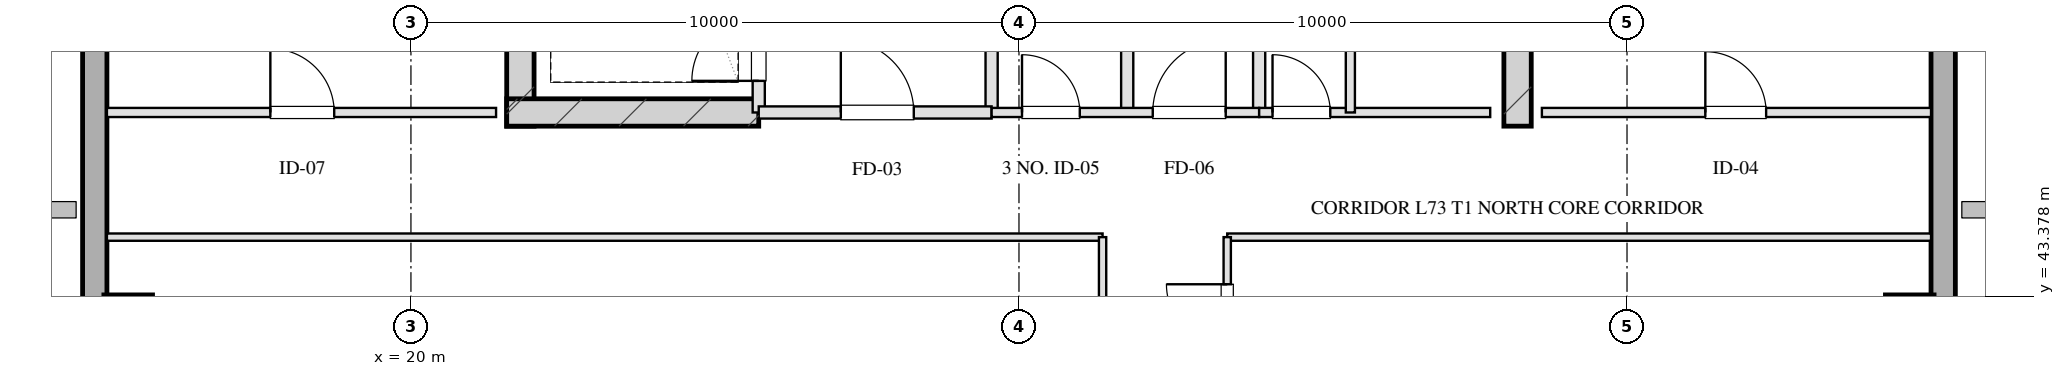
"""IFC4 building model, lengths in metres.
Left out: names, types, materials, properties, quantities, classifications, styles, units other than length and angle.
Written with IfcOpenShell. Run it as: python <this file> out.ifc"""

import sys

from ifc_helpers import new_model, si_unit, direction, frame, frame_2d, origin, origin_2d, place, context, subcontext, project, spatial, rectangle, hollow_rectangle, extrude, element, fill, save


model = new_model("IFC4")
c1 = context("Model", 3, precision=1e-05, world=origin(), true_north=direction((0.0, 1.0)))
c2 = subcontext(c1, "Body", "Model", "MODEL_VIEW")
j1 = project(units=[si_unit("LENGTHUNIT", "METRE"), si_unit("PLANEANGLEUNIT", "RADIAN")], contexts=[c1])
p1 = place(None, origin())
s1 = spatial("IfcSite", under=j1, at=p1, CompositionType="ELEMENT")
p2 = place(p1, origin())
s2 = spatial("IfcBuilding", under=s1, at=p2, CompositionType="ELEMENT")
p3 = place(p2, frame((0.0, 0.0, 266.4)))
s3 = spatial("IfcBuildingStorey", under=s2, at=p3, CompositionType="ELEMENT", Elevation=266.4)
for number, where, z_axis, x_axis in (
    (1, (21.8, 46.175, 0.0), (0.0, 0.0, 1.0), (0.0, 1.0, 0.0)),
    (2, (38.2, 46.175, 0.0), (0.0, 0.0, 1.0), (0.0, 1.0, 0.0)),
):
    element("IfcWall", number, at=place(p3, frame(where, z_axis=z_axis, x_axis=x_axis)), inside=s3, PredefinedType="SHEAR", context=c2, shape_type="SweptSolid", body=[
        extrude(rectangle(XDim=9.33, YDim=0.45, at=frame_2d((4.665, 0.0))), origin(), (0.0, 0.0, 1.0), 3.2),
    ])
p4 = place(p3, frame((21.575, 46.4, 0.0), z_axis=(0.0, 0.0, 1.0), x_axis=(1.0, 0.0, 0.0)))
e3 = element("IfcWall", 3, at=p4, inside=s3, PredefinedType="SHEAR", context=c2, shape_type="SweptSolid", body=[
    extrude(rectangle(XDim=4.145, YDim=0.45, at=frame_2d((2.073, 0.0))), origin(), (0.0, 0.0, 1.0), 3.2),
])
for number, where, z_axis, x_axis in (
    (4, (15.35, 43.0, 0.0), (0.0, 0.0, 1.0), (1.0, 0.0, 0.0)),
    (5, (44.65, 43.0, 0.0), (0.0, 0.0, 1.0), (1.0, 0.0, 0.0)),
):
    element("IfcColumn", number, at=place(p3, frame(where, z_axis=z_axis, x_axis=x_axis)), inside=s3, PredefinedType="COLUMN", context=c2, shape_type="SweptSolid", body=[
        extrude(hollow_rectangle(XDim=0.8, YDim=0.8, WallThickness=0.028, at=origin_2d()), origin(), (0.0, 0.0, 1.0), 3.201),
    ])
p5 = place(p3, frame((14.8, 13.1, 0.0), z_axis=(0.0, 0.0, 1.0), x_axis=(0.0, 1.0, 0.0)))
e6 = element("IfcWall", 6, at=p5, inside=s3, PredefinedType="SOLIDWALL", context=c2, shape_type="SweptSolid", body=[
    extrude(rectangle(XDim=41.8, YDim=0.4, at=frame_2d((20.9, 0.0))), origin(), (0.0, 0.0, 1.0), 2.36),
])
p6 = place(p5, frame((13.525, 0.0, 0.75)))
e7 = element("IfcOpeningElement", 7, at=p6, cuts=e6, PredefinedType="OPENING", context=c2, shape_type="SweptSolid", body=[
    extrude(rectangle(XDim=1.95, YDim=1.21, at=frame_2d((0.975, 0.605))), frame((0.0, 0.21, 0.0), z_axis=(0.0, -1.0, 0.0), x_axis=(1.0, 0.0, 0.0)), (0.0, 0.0, 1.0), 0.42),
])
p7 = place(p5, frame((17.325, 0.0, 0.75)))
e8 = element("IfcOpeningElement", 8, at=p7, cuts=e6, PredefinedType="OPENING", context=c2, shape_type="SweptSolid", body=[
    extrude(rectangle(XDim=1.95, YDim=1.21, at=frame_2d((0.975, 0.605))), frame((0.0, 0.21, 0.0), z_axis=(0.0, -1.0, 0.0), x_axis=(1.0, 0.0, 0.0)), (0.0, 0.0, 1.0), 0.42),
])
p8 = place(p5, frame((26.15, 0.0, 0.0)))
e9 = element("IfcOpeningElement", 9, at=p8, cuts=e6, PredefinedType="OPENING", context=c2, shape_type="SweptSolid", body=[
    extrude(rectangle(XDim=1.1, YDim=2.15, at=frame_2d((0.55, 1.075))), frame((0.0, 0.21, 0.0), z_axis=(0.0, -1.0, 0.0), x_axis=(1.0, 0.0, 0.0)), (0.0, 0.0, 1.0), 0.42),
])
p9 = place(p3, frame((45.2, 54.9, 0.0), z_axis=(0.0, 0.0, 1.0), x_axis=(0.0, -1.0, 0.0)))
e10 = element("IfcWall", 10, at=p9, inside=s3, PredefinedType="SOLIDWALL", context=c2, shape_type="SweptSolid", body=[
    extrude(rectangle(XDim=41.8, YDim=0.4, at=frame_2d((20.9, 0.0))), origin(), (0.0, 0.0, 1.0), 2.36),
])
p10 = place(p9, frame((26.325, 0.0, 0.75)))
e11 = element("IfcOpeningElement", 11, at=p10, cuts=e10, PredefinedType="OPENING", context=c2, shape_type="SweptSolid", body=[
    extrude(rectangle(XDim=1.95, YDim=1.21, at=frame_2d((0.975, 0.605))), frame((0.0, 0.21, 0.0), z_axis=(0.0, -1.0, 0.0), x_axis=(1.0, 0.0, 0.0)), (0.0, 0.0, 1.0), 0.42),
])
p11 = place(p9, frame((22.525, 0.0, 0.75)))
e12 = element("IfcOpeningElement", 12, at=p11, cuts=e10, PredefinedType="OPENING", context=c2, shape_type="SweptSolid", body=[
    extrude(rectangle(XDim=1.95, YDim=1.21, at=frame_2d((0.975, 0.605))), frame((0.0, 0.21, 0.0), z_axis=(0.0, -1.0, 0.0), x_axis=(1.0, 0.0, 0.0)), (0.0, 0.0, 1.0), 0.42),
])
p12 = place(p9, frame((14.55, 0.0, 0.0)))
e13 = element("IfcOpeningElement", 13, at=p12, cuts=e10, PredefinedType="OPENING", context=c2, shape_type="SweptSolid", body=[
    extrude(rectangle(XDim=1.1, YDim=2.15, at=frame_2d((0.55, 1.075))), frame((0.0, 0.21, 0.0), z_axis=(0.0, -1.0, 0.0), x_axis=(1.0, 0.0, 0.0)), (0.0, 0.0, 1.0), 0.42),
])
p13 = place(p3, frame((25.72, 46.4, 0.0), z_axis=(0.0, 0.0, 1.0), x_axis=(0.0, 1.0, 0.0)))
e14 = element("IfcWall", 14, at=p13, inside=s3, PredefinedType="PARTITIONING", context=c2, shape_type="SweptSolid", body=[
    extrude(rectangle(XDim=1.9, YDim=0.2, at=frame_2d((0.95, 0.0))), origin(), (0.0, 0.0, 1.0), 2.925),
])
p14 = place(p13, frame((0.52, 0.0, 0.0)))
e15 = element("IfcOpeningElement", 15, at=p14, cuts=e14, PredefinedType="OPENING", context=c2, shape_type="SweptSolid", body=[
    extrude(rectangle(XDim=1.1, YDim=2.05, at=frame_2d((0.55, 1.025))), frame((0.0, 0.11, 0.0), z_axis=(0.0, -1.0, 0.0), x_axis=(1.0, 0.0, 0.0)), (0.0, 0.0, 1.0), 0.22),
])
p15 = place(p3, frame((29.55, 46.4, 0.0), z_axis=(0.0, 0.0, 1.0), x_axis=(0.0, 1.0, 0.0)))
e16 = element("IfcWall", 16, at=p15, inside=s3, PredefinedType="PARTITIONING", context=c2, shape_type="SweptSolid", body=[
    extrude(rectangle(XDim=8.43, YDim=0.2, at=frame_2d((4.215, 0.0))), origin(), (0.0, 0.0, 1.0), 2.925),
])
p16 = place(p3, frame((25.72, 46.4, 0.0), z_axis=(0.0, 0.0, 1.0), x_axis=(1.0, 0.0, 0.0)))
e17 = element("IfcWall", 17, at=p16, inside=s3, PredefinedType="PARTITIONING", context=c2, shape_type="SweptSolid", body=[
    extrude(rectangle(XDim=3.83, YDim=0.2, at=frame_2d((1.915, 0.0))), origin(), (0.0, 0.0, 1.0), 2.925),
])
p17 = place(p16, frame((1.35, 0.0, 0.0)))
e18 = element("IfcOpeningElement", 18, at=p17, cuts=e17, PredefinedType="OPENING", context=c2, shape_type="SweptSolid", body=[
    extrude(rectangle(XDim=1.2, YDim=2.05, at=frame_2d((0.6, 1.025))), frame((0.0, 0.11, 0.0), z_axis=(0.0, -1.0, 0.0), x_axis=(1.0, 0.0, 0.0)), (0.0, 0.0, 1.0), 0.22),
])
for number, where, z_axis, x_axis in (
    (19, (33.95, 46.4, 0.0), (0.0, 0.0, 1.0), (0.0, 1.0, 0.0)),
    (20, (31.78, 46.4, 0.0), (0.0, 0.0, 1.0), (0.0, 1.0, 0.0)),
):
    element("IfcWall", number, at=place(p3, frame(where, z_axis=z_axis, x_axis=x_axis)), inside=s3, PredefinedType="PARTITIONING", context=c2, shape_type="SweptSolid", body=[
        extrude(rectangle(XDim=8.43, YDim=0.2, at=frame_2d((4.215, 0.0))), origin(), (0.0, 0.0, 1.0), 2.925),
    ])
p18 = place(p3, frame((29.55, 46.4, 0.0), z_axis=(0.0, 0.0, 1.0), x_axis=(1.0, 0.0, 0.0)))
e21 = element("IfcWall", 21, at=p18, inside=s3, PredefinedType="PARTITIONING", context=c2, shape_type="SweptSolid", body=[
    extrude(rectangle(XDim=4.4, YDim=0.15, at=frame_2d((2.2, 0.0))), origin(), (0.0, 0.0, 1.0), 2.925),
])
p19 = place(p18, frame((0.5, 0.0, 0.0)))
e22 = element("IfcOpeningElement", 22, at=p19, cuts=e21, PredefinedType="OPENING", context=c2, shape_type="SweptSolid", body=[
    extrude(rectangle(XDim=0.95, YDim=2.05, at=frame_2d((0.475, 1.025))), frame((0.0, 0.085, 0.0), z_axis=(0.0, -1.0, 0.0), x_axis=(1.0, 0.0, 0.0)), (0.0, 0.0, 1.0), 0.17),
])
p20 = place(p18, frame((2.65, 0.0, 0.0)))
e23 = element("IfcOpeningElement", 23, at=p20, cuts=e21, PredefinedType="OPENING", context=c2, shape_type="SweptSolid", body=[
    extrude(rectangle(XDim=1.2, YDim=2.05, at=frame_2d((0.6, 1.025))), frame((0.0, 0.085, 0.0), z_axis=(0.0, -1.0, 0.0), x_axis=(1.0, 0.0, 0.0)), (0.0, 0.0, 1.0), 0.17),
])
p21 = place(p3, frame((33.95, 46.4, 0.0), z_axis=(0.0, 0.0, 1.0), x_axis=(1.0, 0.0, 0.0)))
e24 = element("IfcWall", 24, at=p21, inside=s3, PredefinedType="PARTITIONING", context=c2, shape_type="SweptSolid", body=[
    extrude(rectangle(XDim=3.8, YDim=0.15, at=frame_2d((1.9, 0.0))), origin(), (0.0, 0.0, 1.0), 2.925),
])
p22 = place(p21, frame((0.22, 0.0, 0.0)))
e25 = element("IfcOpeningElement", 25, at=p22, cuts=e24, PredefinedType="OPENING", context=c2, shape_type="SweptSolid", body=[
    extrude(rectangle(XDim=0.95, YDim=2.05, at=frame_2d((0.475, 1.025))), frame((0.0, 0.085, 0.0), z_axis=(0.0, -1.0, 0.0), x_axis=(1.0, 0.0, 0.0)), (0.0, 0.0, 1.0), 0.17),
])
p23 = place(p3, frame((35.45, 46.4, 0.0), z_axis=(0.0, 0.0, 1.0), x_axis=(0.0, 1.0, 0.0)))
e26 = element("IfcWall", 26, at=p23, inside=s3, PredefinedType="PARTITIONING", context=c2, shape_type="SweptSolid", body=[
    extrude(rectangle(XDim=8.43, YDim=0.15, at=frame_2d((4.215, 0.0))), origin(), (0.0, 0.0, 1.0), 2.565),
])
p24 = place(p23, frame((2.55, 0.0, 0.0)))
e27 = element("IfcOpeningElement", 27, at=p24, cuts=e26, PredefinedType="OPENING", context=c2, shape_type="SweptSolid", body=[
    extrude(rectangle(XDim=0.95, YDim=2.05, at=frame_2d((0.475, 1.025))), frame((0.0, 0.085, 0.0), z_axis=(0.0, -1.0, 0.0), x_axis=(1.0, 0.0, 0.0)), (0.0, 0.0, 1.0), 0.17),
])
p25 = place(p23, frame((5.8, 0.0, 0.0)))
e28 = element("IfcOpeningElement", 28, at=p25, cuts=e26, PredefinedType="OPENING", context=c2, shape_type="SweptSolid", body=[
    extrude(rectangle(XDim=0.9, YDim=2.05, at=frame_2d((0.45, 1.025))), frame((0.0, 0.085, 0.0), z_axis=(0.0, -1.0, 0.0), x_axis=(1.0, 0.0, 0.0)), (0.0, 0.0, 1.0), 0.17),
])
p26 = place(p3, frame((15.0, 46.4, 0.0), z_axis=(0.0, 0.0, 1.0), x_axis=(1.0, 0.0, 0.0)))
e29 = element("IfcWall", 29, at=p26, inside=s3, PredefinedType="PARTITIONING", context=c2, shape_type="SweptSolid", body=[
    extrude(rectangle(XDim=6.4, YDim=0.15, at=frame_2d((3.2, 0.0))), origin(), (0.0, 0.0, 1.0), 2.925),
])
p27 = place(p26, frame((2.688, 0.0, 0.0)))
e30 = element("IfcOpeningElement", 30, at=p27, cuts=e29, PredefinedType="OPENING", context=c2, shape_type="SweptSolid", body=[
    extrude(rectangle(XDim=1.05, YDim=2.05, at=frame_2d((0.525, 1.025))), frame((0.0, 0.085, 0.0), z_axis=(0.0, -1.0, 0.0), x_axis=(1.0, 0.0, 0.0)), (0.0, 0.0, 1.0), 0.17),
])
p28 = place(p3, frame((38.6, 46.4, 0.0), z_axis=(0.0, 0.0, 1.0), x_axis=(1.0, 0.0, 0.0)))
e31 = element("IfcWall", 31, at=p28, inside=s3, PredefinedType="PARTITIONING", context=c2, shape_type="SweptSolid", body=[
    extrude(rectangle(XDim=6.4, YDim=0.15, at=frame_2d((3.2, 0.0))), origin(), (0.0, 0.0, 1.0), 2.925),
])
p29 = place(p28, frame((2.688, 0.0, 0.0)))
e32 = element("IfcOpeningElement", 32, at=p29, cuts=e31, PredefinedType="OPENING", context=c2, shape_type="SweptSolid", body=[
    extrude(rectangle(XDim=1.0, YDim=2.05, at=frame_2d((0.5, 1.025))), frame((0.0, 0.085, 0.0), z_axis=(0.0, -1.0, 0.0), x_axis=(1.0, 0.0, 0.0)), (0.0, 0.0, 1.0), 0.17),
])
p30 = place(p3, frame((15.0, 44.35, 0.0), z_axis=(0.0, 0.0, 1.0), x_axis=(1.0, 0.0, 0.0)))
e33 = element("IfcWall", 33, at=p30, inside=s3, PredefinedType="PARTITIONING", context=c2, shape_type="SweptSolid", body=[
    extrude(rectangle(XDim=16.375, YDim=0.12, at=frame_2d((8.188, 0.0))), origin(), (0.0, 0.0, 1.0), 2.925),
])
p31 = place(p3, frame((33.425, 44.35, 0.0), z_axis=(0.0, 0.0, 1.0), x_axis=(1.0, 0.0, 0.0)))
e34 = element("IfcWall", 34, at=p31, inside=s3, PredefinedType="PARTITIONING", context=c2, shape_type="SweptSolid", body=[
    extrude(rectangle(XDim=11.575, YDim=0.12, at=frame_2d((5.788, 0.0))), origin(), (0.0, 0.0, 1.0), 2.925),
])
p32 = place(p3, frame((31.375, 23.65, 0.0), z_axis=(0.0, 0.0, 1.0), x_axis=(0.0, 1.0, 0.0)))
e35 = element("IfcWall", 35, at=p32, inside=s3, PredefinedType="PARTITIONING", context=c2, shape_type="SweptSolid", body=[
    extrude(rectangle(XDim=20.7, YDim=0.12, at=frame_2d((10.35, 0.0))), origin(), (0.0, 0.0, 1.0), 2.925),
])
p33 = place(p32, frame((2.675, 0.0, 0.0)))
e36 = element("IfcOpeningElement", 36, at=p33, cuts=e35, PredefinedType="OPENING", context=c2, shape_type="SweptSolid", body=[
    extrude(rectangle(XDim=1.0, YDim=2.05, at=frame_2d((0.5, 1.025))), frame((0.0, 0.07, 0.0), z_axis=(0.0, -1.0, 0.0), x_axis=(1.0, 0.0, 0.0)), (0.0, 0.0, 1.0), 0.14),
])
p34 = place(p32, frame((9.85, 0.0, 0.0)))
e37 = element("IfcOpeningElement", 37, at=p34, cuts=e35, PredefinedType="OPENING", context=c2, shape_type="SweptSolid", body=[
    extrude(rectangle(XDim=1.0, YDim=2.05, at=frame_2d((0.5, 1.025))), frame((0.0, 0.07, 0.0), z_axis=(0.0, -1.0, 0.0), x_axis=(1.0, 0.0, 0.0)), (0.0, 0.0, 1.0), 0.14),
])
p35 = place(p32, frame((17.025, 0.0, 0.0)))
e38 = element("IfcOpeningElement", 38, at=p35, cuts=e35, PredefinedType="OPENING", context=c2, shape_type="SweptSolid", body=[
    extrude(rectangle(XDim=1.0, YDim=2.05, at=frame_2d((0.5, 1.025))), frame((0.0, 0.07, 0.0), z_axis=(0.0, -1.0, 0.0), x_axis=(1.0, 0.0, 0.0)), (0.0, 0.0, 1.0), 0.14),
])
p36 = place(p3, frame((33.425, 23.65, 0.0), z_axis=(0.0, 0.0, 1.0), x_axis=(0.0, 1.0, 0.0)))
e39 = element("IfcWall", 39, at=p36, inside=s3, PredefinedType="PARTITIONING", context=c2, shape_type="SweptSolid", body=[
    extrude(rectangle(XDim=20.7, YDim=0.12, at=frame_2d((10.35, 0.0))), origin(), (0.0, 0.0, 1.0), 2.925),
])
p37 = place(p36, frame((2.175, 0.0, 0.0)))
e40 = element("IfcOpeningElement", 40, at=p37, cuts=e39, PredefinedType="OPENING", context=c2, shape_type="SweptSolid", body=[
    extrude(rectangle(XDim=1.0, YDim=2.05, at=frame_2d((0.5, 1.025))), frame((0.0, 0.07, 0.0), z_axis=(0.0, -1.0, 0.0), x_axis=(1.0, 0.0, 0.0)), (0.0, 0.0, 1.0), 0.14),
])
p38 = place(p36, frame((6.75, 0.0, 0.0)))
e41 = element("IfcOpeningElement", 41, at=p38, cuts=e39, PredefinedType="OPENING", context=c2, shape_type="SweptSolid", body=[
    extrude(rectangle(XDim=0.85, YDim=2.05, at=frame_2d((0.425, 1.025))), frame((0.0, 0.07, 0.0), z_axis=(0.0, -1.0, 0.0), x_axis=(1.0, 0.0, 0.0)), (0.0, 0.0, 1.0), 0.14),
])
p39 = place(p36, frame((11.25, 0.0, 0.0)))
e42 = element("IfcOpeningElement", 42, at=p39, cuts=e39, PredefinedType="OPENING", context=c2, shape_type="SweptSolid", body=[
    extrude(rectangle(XDim=1.05, YDim=2.05, at=frame_2d((0.525, 1.025))), frame((0.0, 0.07, 0.0), z_axis=(0.0, -1.0, 0.0), x_axis=(1.0, 0.0, 0.0)), (0.0, 0.0, 1.0), 0.14),
])
p40 = place(p36, frame((15.75, 0.0, 0.0)))
e43 = element("IfcOpeningElement", 43, at=p40, cuts=e39, PredefinedType="OPENING", context=c2, shape_type="SweptSolid", body=[
    extrude(rectangle(XDim=1.0, YDim=2.05, at=frame_2d((0.5, 1.025))), frame((0.0, 0.07, 0.0), z_axis=(0.0, -1.0, 0.0), x_axis=(1.0, 0.0, 0.0)), (0.0, 0.0, 1.0), 0.14),
])
p41 = place(p36, frame((18.925, 0.0, 0.0)))
e44 = element("IfcOpeningElement", 44, at=p41, cuts=e39, PredefinedType="OPENING", context=c2, shape_type="SweptSolid", body=[
    extrude(rectangle(XDim=1.0, YDim=2.05, at=frame_2d((0.5, 1.025))), frame((0.0, 0.07, 0.0), z_axis=(0.0, -1.0, 0.0), x_axis=(1.0, 0.0, 0.0)), (0.0, 0.0, 1.0), 0.14),
])
p42 = place(p14, origin())
e45 = element("IfcDoor", 45, at=p42, inside=s3, OperationType="SINGLE_SWING_LEFT", PredefinedType="DOOR", context=c2, shape_type="SweptSolid", body=[
    extrude(rectangle(XDim=1.1, YDim=2.05, at=frame_2d((0.55, 1.025))), frame((0.0, 0.025, 0.0), z_axis=(0.0, -1.0, 0.0), x_axis=(1.0, 0.0, 0.0)), (0.0, 0.0, 1.0), 0.05),
])
fill(e15, e45)
p43 = place(p17, origin())
e46 = element("IfcDoor", 46, at=p43, inside=s3, OperationType="SINGLE_SWING_LEFT", PredefinedType="DOOR", context=c2, shape_type="SweptSolid", body=[
    extrude(rectangle(XDim=1.2, YDim=2.05, at=frame_2d((0.6, 1.025))), frame((0.0, 0.025, 0.0), z_axis=(0.0, -1.0, 0.0), x_axis=(1.0, 0.0, 0.0)), (0.0, 0.0, 1.0), 0.05),
])
fill(e18, e46)
p44 = place(p19, origin())
e47 = element("IfcDoor", 47, at=p44, inside=s3, OperationType="SINGLE_SWING_LEFT", PredefinedType="DOOR", context=c2, shape_type="SweptSolid", body=[
    extrude(rectangle(XDim=0.95, YDim=2.05, at=frame_2d((0.475, 1.025))), frame((0.0, 0.025, 0.0), z_axis=(0.0, -1.0, 0.0), x_axis=(1.0, 0.0, 0.0)), (0.0, 0.0, 1.0), 0.05),
])
fill(e22, e47)
p45 = place(p20, origin())
e48 = element("IfcDoor", 48, at=p45, inside=s3, OperationType="SINGLE_SWING_RIGHT", PredefinedType="DOOR", context=c2, shape_type="SweptSolid", body=[
    extrude(rectangle(XDim=1.2, YDim=2.05, at=frame_2d((0.6, 1.025))), frame((0.0, 0.025, 0.0), z_axis=(0.0, -1.0, 0.0), x_axis=(1.0, 0.0, 0.0)), (0.0, 0.0, 1.0), 0.05),
])
fill(e23, e48)
p46 = place(p22, origin())
e49 = element("IfcDoor", 49, at=p46, inside=s3, OperationType="SINGLE_SWING_LEFT", PredefinedType="DOOR", context=c2, shape_type="SweptSolid", body=[
    extrude(rectangle(XDim=0.95, YDim=2.05, at=frame_2d((0.475, 1.025))), frame((0.0, 0.025, 0.0), z_axis=(0.0, -1.0, 0.0), x_axis=(1.0, 0.0, 0.0)), (0.0, 0.0, 1.0), 0.05),
])
fill(e25, e49)
p47 = place(p27, origin())
e50 = element("IfcDoor", 50, at=p47, inside=s3, OperationType="SINGLE_SWING_LEFT", PredefinedType="DOOR", context=c2, shape_type="SweptSolid", body=[
    extrude(rectangle(XDim=1.05, YDim=2.05, at=frame_2d((0.525, 1.025))), frame((0.0, 0.025, 0.0), z_axis=(0.0, -1.0, 0.0), x_axis=(1.0, 0.0, 0.0)), (0.0, 0.0, 1.0), 0.05),
])
fill(e30, e50)
p48 = place(p29, origin())
e51 = element("IfcDoor", 51, at=p48, inside=s3, OperationType="SINGLE_SWING_LEFT", PredefinedType="DOOR", context=c2, shape_type="SweptSolid", body=[
    extrude(rectangle(XDim=1.0, YDim=2.05, at=frame_2d((0.5, 1.025))), frame((0.0, 0.025, 0.0), z_axis=(0.0, -1.0, 0.0), x_axis=(1.0, 0.0, 0.0)), (0.0, 0.0, 1.0), 0.05),
])
fill(e32, e51)
p49 = place(p41, origin())
e52 = element("IfcDoor", 52, at=p49, inside=s3, OperationType="SINGLE_SWING_RIGHT", PredefinedType="DOOR", context=c2, shape_type="SweptSolid", body=[
    extrude(rectangle(XDim=1.0, YDim=2.05, at=frame_2d((0.5, 1.025))), frame((0.0, 0.025, 0.0), z_axis=(0.0, -1.0, 0.0), x_axis=(1.0, 0.0, 0.0)), (0.0, 0.0, 1.0), 0.05),
])
fill(e44, e52)
save(model, sys.argv[1])
